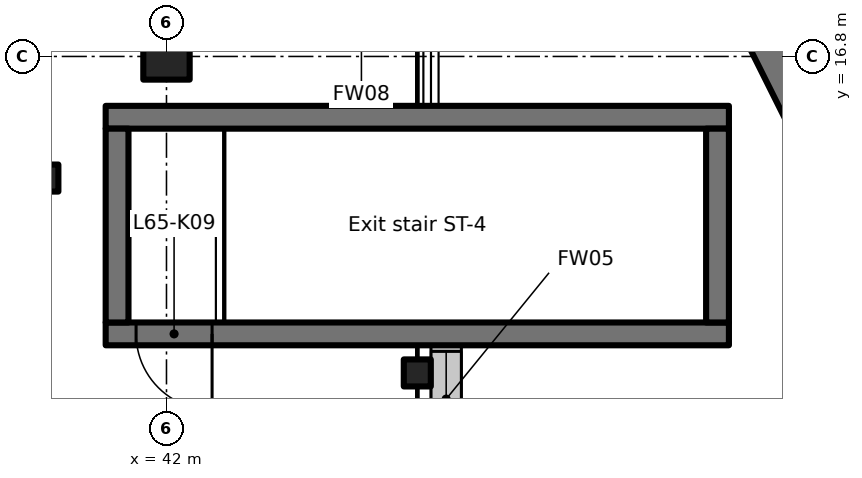
"""IFC4 building model, lengths in metres.
Left out: names, types, materials, properties, quantities, classifications, styles, units other than length and angle.
Written with IfcOpenShell. Run it as: python <this file> out.ifc"""

import sys

from ifc_helpers import new_model, si_unit, direction, frame, frame_2d, origin, origin_2d, place, context, subcontext, project, spatial, rectangle, hollow_circle, extrude, element, fill, save


model = new_model("IFC4")
c1 = context("Model", 3, precision=1e-05, world=origin(), true_north=direction((0.0, 1.0)))
c2 = subcontext(c1, "Body", "Model", "MODEL_VIEW")
j1 = project(units=[si_unit("LENGTHUNIT", "METRE"), si_unit("PLANEANGLEUNIT", "RADIAN")], contexts=[c1])
p1 = place(None, origin())
s1 = spatial("IfcSite", under=j1, at=p1, CompositionType="ELEMENT")
p2 = place(p1, origin())
s2 = spatial("IfcBuilding", under=s1, at=p2, CompositionType="ELEMENT")
p3 = place(p2, frame((0.0, 0.0, 256.2)))
s3 = spatial("IfcBuildingStorey", under=s2, at=p3, CompositionType="ELEMENT", Elevation=256.2)
p4 = place(p3, frame((50.937, 15.727, 0.0), z_axis=(0.0, 0.0, 1.0), x_axis=(-0.447294975496, 0.894386496374, 0.0)))
e1 = element("IfcWall", 1, at=p4, inside=s3, PredefinedType="SOLIDWALL", context=c2, shape_type="SweptSolid", body=[
    extrude(rectangle(XDim=2.4, YDim=1.2, at=frame_2d((1.2, 0.0))), origin(), (0.0, 0.0, 1.0), 8.0),
])
p5 = place(p3, frame((45.3, 12.636, 0.0), z_axis=(0.0, 0.0, 1.0), x_axis=(1.0, 0.0, 0.0)))
e2 = element("IfcColumn", 2, at=p5, inside=s3, PredefinedType="COLUMN", context=c2, shape_type="SweptSolid", body=[
    extrude(hollow_circle(Radius=0.178, WallThickness=0.012, at=origin_2d()), origin(), (0.0, 0.0, 1.0), 7.7),
])
p6 = place(p3, frame((49.4, 13.15, 0.0), z_axis=(0.0, 0.0, 1.0), x_axis=(-1.0, 0.0, 0.0)))
e3 = element("IfcWall", 3, at=p6, inside=s3, PredefinedType="SHEAR", context=c2, shape_type="SweptSolid", body=[
    extrude(rectangle(XDim=8.2, YDim=0.3, at=frame_2d((4.1, 0.0))), origin(), (0.0, 0.0, 1.0), 3.2),
])
p7 = place(p6, frame((6.8, 0.0, 0.0)))
e4 = element("IfcOpeningElement", 4, at=p7, cuts=e3, PredefinedType="OPENING", context=c2, shape_type="SweptSolid", body=[
    extrude(rectangle(XDim=1.0, YDim=2.1, at=frame_2d((0.5, 1.05))), frame((0.0, 0.16, 0.0), z_axis=(0.0, -1.0, 0.0), x_axis=(1.0, 0.0, 0.0)), (0.0, 0.0, 1.0), 0.32),
])
p8 = place(p3, frame((41.2, 16.0, 0.0), z_axis=(0.0, 0.0, 1.0), x_axis=(1.0, 0.0, 0.0)))
e5 = element("IfcWall", 5, at=p8, inside=s3, PredefinedType="SHEAR", context=c2, shape_type="SweptSolid", body=[
    extrude(rectangle(XDim=8.2, YDim=0.3, at=frame_2d((4.1, 0.0))), origin(), (0.0, 0.0, 1.0), 3.2),
])
for number, where, z_axis, x_axis in (
    (6, (41.35, 13.3, 0.0), (0.0, 0.0, 1.0), (0.0, 1.0, 0.0)),
    (7, (49.25, 13.3, 0.0), (0.0, 0.0, 1.0), (0.0, 1.0, 0.0)),
):
    element("IfcWall", number, at=place(p3, frame(where, z_axis=z_axis, x_axis=x_axis)), inside=s3, PredefinedType="SHEAR", context=c2, shape_type="SweptSolid", body=[
        extrude(rectangle(XDim=2.55, YDim=0.3, at=frame_2d((1.275, 0.0))), origin(), (0.0, 0.0, 1.0), 3.2),
    ])
p9 = place(p3, frame((45.68, 13.02, 0.0), z_axis=(0.0, 0.0, 1.0), x_axis=(0.0, -1.0, 0.0)))
e8 = element("IfcWall", 8, at=p9, inside=s3, PredefinedType="SOLIDWALL", context=c2, shape_type="SweptSolid", body=[
    extrude(rectangle(XDim=5.509, YDim=0.4, at=frame_2d((2.755, 0.0))), origin(), (0.0, 0.0, 1.0), 7.7),
])
p10 = place(p9, frame((1.555, 0.0, 0.0)))
e9 = element("IfcOpeningElement", 9, at=p10, cuts=e8, PredefinedType="OPENING", context=c2, shape_type="SweptSolid", body=[
    extrude(rectangle(XDim=2.4, YDim=2.7, at=frame_2d((1.2, 1.35))), frame((0.0, 0.21, 0.0), z_axis=(0.0, -1.0, 0.0), x_axis=(1.0, 0.0, 0.0)), (0.0, 0.0, 1.0), 0.42),
])
p11 = place(p9, frame((0.1, 0.0, 0.0)))
e10 = element("IfcOpeningElement", 10, at=p11, cuts=e8, PredefinedType="OPENING", context=c2, shape_type="SweptSolid", body=[
    extrude(rectangle(XDim=1.255, YDim=2.8, at=frame_2d((0.627, 1.4))), frame((0.0, 0.21, 0.0), z_axis=(0.0, -1.0, 0.0), x_axis=(1.0, 0.0, 0.0)), (0.0, 0.0, 1.0), 0.42),
])
p12 = place(p9, frame((4.155, 0.0, 0.0)))
e11 = element("IfcOpeningElement", 11, at=p12, cuts=e8, PredefinedType="OPENING", context=c2, shape_type="SweptSolid", body=[
    extrude(rectangle(XDim=1.255, YDim=2.8, at=frame_2d((0.627, 1.4))), frame((0.0, 0.21, 0.0), z_axis=(0.0, -1.0, 0.0), x_axis=(1.0, 0.0, 0.0)), (0.0, 0.0, 1.0), 0.42),
])
p13 = place(p3, frame((42.0, 16.8, 0.0), z_axis=(0.0, 0.0, 1.0), x_axis=(1.0, 0.0, 0.0)))
e12 = element("IfcColumn", 12, at=p13, inside=s3, PredefinedType="COLUMN", context=c2, shape_type="SweptSolid", body=[
    extrude(hollow_circle(Radius=0.305, WallThickness=0.016, at=origin_2d()), origin(), (0.0, 0.0, 1.0), 7.7),
])
p14 = place(p3, frame((40.4, 15.2, 0.0), z_axis=(0.0, 0.0, 1.0), x_axis=(1.0, 0.0, 0.0)))
e13 = element("IfcColumn", 13, at=p14, inside=s3, PredefinedType="COLUMN", context=c2, shape_type="SweptSolid", body=[
    extrude(hollow_circle(Radius=0.178, WallThickness=0.012, at=origin_2d()), origin(), (0.0, 0.0, 1.0), 1.2),
])
p15 = place(p7, origin())
e14 = element("IfcDoor", 14, at=p15, inside=s3, OperationType="SINGLE_SWING_RIGHT", PredefinedType="DOOR", context=c2, shape_type="SweptSolid", body=[
    extrude(rectangle(XDim=1.0, YDim=2.1, at=frame_2d((0.5, 1.05))), frame((0.0, 0.025, 0.0), z_axis=(0.0, -1.0, 0.0), x_axis=(1.0, 0.0, 0.0)), (0.0, 0.0, 1.0), 0.05),
])
fill(e4, e14)
p16 = place(p11, origin())
e15 = element("IfcWindow", 15, at=p16, inside=s3, PartitioningType="SINGLE_PANEL", PredefinedType="WINDOW", context=c2, shape_type="SweptSolid", body=[
    extrude(rectangle(XDim=1.255, YDim=2.8, at=frame_2d((0.627, 1.4))), frame((0.0, 0.03, 0.0), z_axis=(0.0, -1.0, 0.0), x_axis=(1.0, 0.0, 0.0)), (0.0, 0.0, 1.0), 0.06),
])
fill(e10, e15)
save(model, sys.argv[1])
